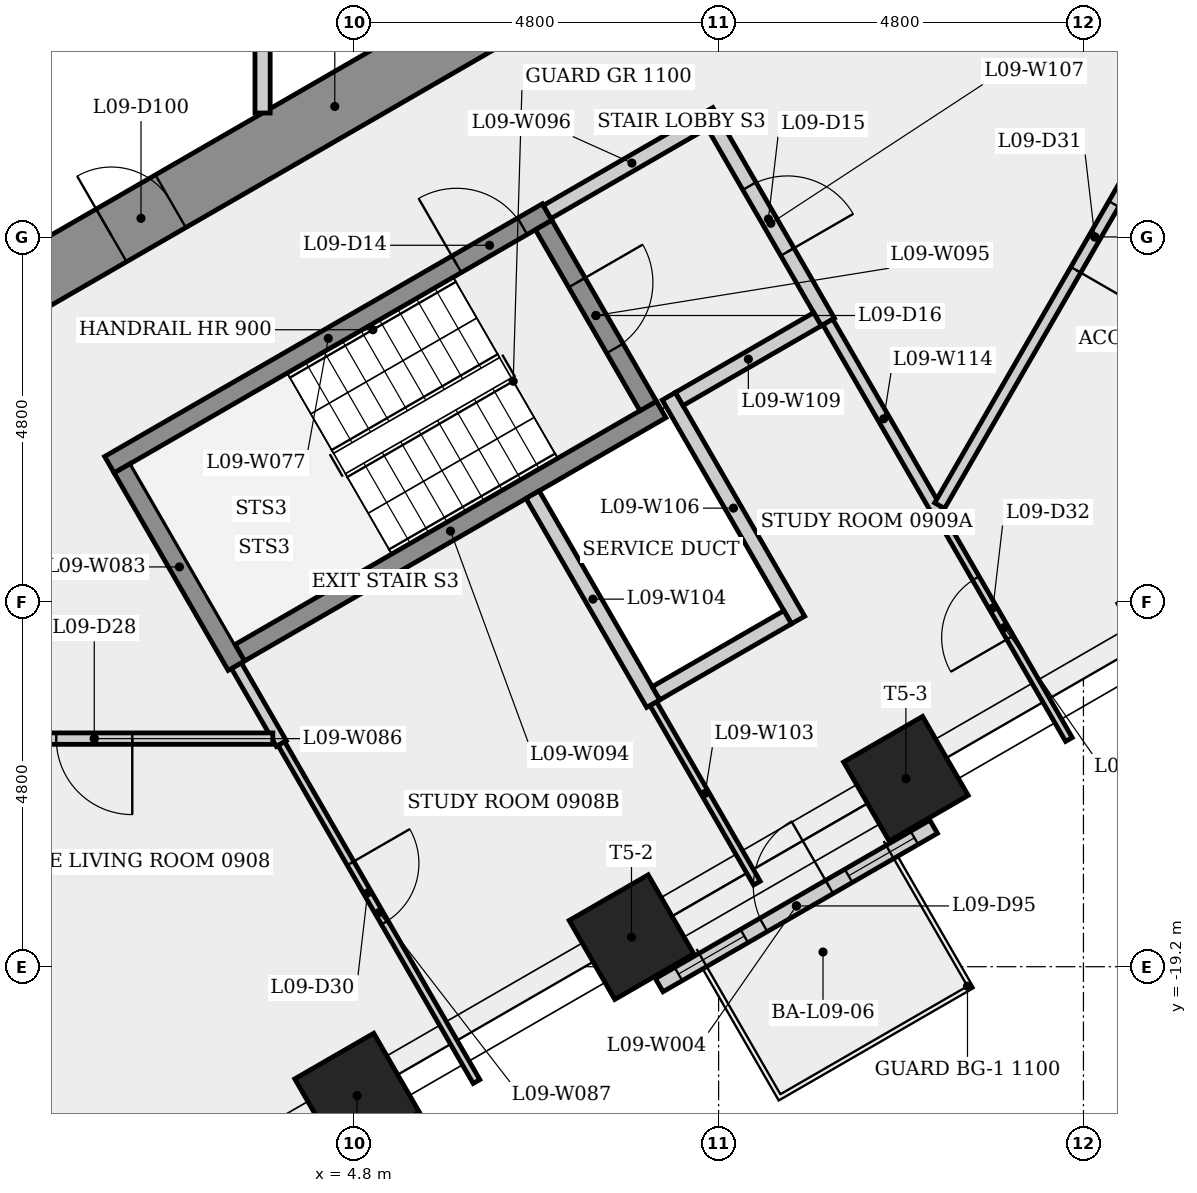
"""IFC4 building model, lengths in metres.
Left out: names, types, materials, properties, quantities, classifications, styles, units other than length and angle.
Written with IfcOpenShell. Run it as: python <this file> out.ifc"""

import sys

from ifc_helpers import new_model, si_unit, direction, frame, frame_2d, origin, origin_2d, place, context, subcontext, project, spatial, rectangle, extrude, element, fill, save


model = new_model("IFC4")
c1 = context("Model", 3, precision=1e-05, world=origin(), true_north=direction((0.0, 1.0)))
c2 = subcontext(c1, "Body", "Model", "MODEL_VIEW")
j1 = project(units=[si_unit("LENGTHUNIT", "METRE"), si_unit("PLANEANGLEUNIT", "RADIAN")], contexts=[c1])
p1 = place(None, origin())
s1 = spatial("IfcSite", under=j1, at=p1, CompositionType="ELEMENT")
p2 = place(p1, origin())
s2 = spatial("IfcBuilding", under=s1, at=p2, CompositionType="ELEMENT")
p3 = place(p2, frame((0.0, 0.0, 39.1)))
s3 = spatial("IfcBuildingStorey", under=s2, at=p3, CompositionType="ELEMENT", Elevation=39.1)
p4 = place(p3, frame((-0.2, -10.623, 0.0), z_axis=(0.0, 0.0, 1.0), x_axis=(0.866023993627, 0.500002442456, 0.0)))
e1 = element("IfcWall", 1, at=p4, inside=s3, PredefinedType="SHEAR", context=c2, shape_type="SweptSolid", body=[
    extrude(rectangle(XDim=10.97, YDim=0.8, at=frame_2d((5.485, 0.0))), origin(), (0.0, 0.0, 1.0), 3.4),
])
p5 = place(p4, frame((2.091, 0.0, 0.0)))
e2 = element("IfcOpeningElement", 2, at=p5, cuts=e1, PredefinedType="OPENING", context=c2, shape_type="SweptSolid", body=[
    extrude(rectangle(XDim=0.9, YDim=2.1, at=frame_2d((0.45, 1.05))), frame((0.0, 0.41, 0.0), z_axis=(0.0, -1.0, 0.0), x_axis=(1.0, 0.0, 0.0)), (0.0, 0.0, 1.0), 0.82),
])
p6 = place(p4, frame((9.325, 0.0, 0.0)))
e3 = element("IfcOpeningElement", 3, at=p6, cuts=e1, PredefinedType="OPENING", context=c2, shape_type="SweptSolid", body=[
    extrude(rectangle(XDim=0.9, YDim=2.1, at=frame_2d((0.45, 1.05))), frame((0.0, 0.41, 0.0), z_axis=(0.0, -1.0, 0.0), x_axis=(1.0, 0.0, 0.0)), (0.0, 0.0, 1.0), 0.82),
])
for number, where, z_axis, x_axis in (
    (4, (4.843, -20.895, 0.0), (0.0, 0.0, 1.0), (0.5, -0.866, 0.0)),
    (5, (8.454, -18.811, 0.0), (0.0, 0.0, 1.0), (0.5, -0.866, 0.0)),
    (6, (12.064, -16.727, 0.0), (0.0, 0.0, 1.0), (0.5, -0.866, 0.0)),
):
    element("IfcColumn", number, at=place(p3, frame(where, z_axis=z_axis, x_axis=x_axis)), inside=s3, PredefinedType="COLUMN", context=c2, shape_type="SweptSolid", body=[
        extrude(rectangle(XDim=1.2, YDim=1.2, at=origin_2d()), origin(), (0.0, 0.0, 1.0), 3.4),
    ])
p7 = place(p3, frame((8.819, -19.443, 0.0), z_axis=(0.0, 0.0, 1.0), x_axis=(0.866036386482, 0.499980976928, 0.0)))
e7 = element("IfcWall", 7, at=p7, inside=s3, PredefinedType="SOLIDWALL", context=c2, shape_type="SweptSolid", body=[
    extrude(rectangle(XDim=4.169, YDim=0.2, at=frame_2d((2.084, 0.0))), origin(), (0.0, 0.0, 1.0), 3.4),
])
p8 = place(p7, frame((1.584, 0.0, 0.0)))
e8 = element("IfcOpeningElement", 8, at=p8, cuts=e7, PredefinedType="OPENING", context=c2, shape_type="SweptSolid", body=[
    extrude(rectangle(XDim=1.0, YDim=2.4, at=frame_2d((0.5, 1.2))), frame((0.0, 0.11, 0.0), z_axis=(0.0, -1.0, 0.0), x_axis=(1.0, 0.0, 0.0)), (0.0, 0.0, 1.0), 0.22),
])
p9 = place(p7, frame((0.292, 0.0, 0.9)))
e9 = element("IfcOpeningElement", 9, at=p9, cuts=e7, PredefinedType="OPENING", context=c2, shape_type="SweptSolid", body=[
    extrude(rectangle(XDim=1.0, YDim=1.5, at=frame_2d((0.5, 0.75))), frame((0.0, 0.11, 0.0), z_axis=(0.0, -1.0, 0.0), x_axis=(1.0, 0.0, 0.0)), (0.0, 0.0, 1.0), 0.22),
])
p10 = place(p7, frame((2.877, 0.0, 0.9)))
e10 = element("IfcOpeningElement", 10, at=p10, cuts=e7, PredefinedType="OPENING", context=c2, shape_type="SweptSolid", body=[
    extrude(rectangle(XDim=1.0, YDim=1.5, at=frame_2d((0.5, 0.75))), frame((0.0, 0.11, 0.0), z_axis=(0.0, -1.0, 0.0), x_axis=(1.0, 0.0, 0.0)), (0.0, 0.0, 1.0), 0.22),
])
p11 = place(p3, frame((1.585, -12.595, 0.0), z_axis=(0.0, 0.0, 1.0), x_axis=(0.866036417653, 0.499980922934, 0.0)))
e11 = element("IfcWall", 11, at=p11, inside=s3, PredefinedType="SHEAR", context=c2, shape_type="SweptSolid", body=[
    extrude(rectangle(XDim=6.65, YDim=0.25, at=frame_2d((3.325, 0.0))), origin(), (0.0, 0.0, 1.0), 3.05),
])
p12 = place(p11, frame((5.275, 0.0, 0.0)))
e12 = element("IfcOpeningElement", 12, at=p12, cuts=e11, PredefinedType="OPENING", context=c2, shape_type="SweptSolid", body=[
    extrude(rectangle(XDim=1.0, YDim=2.1, at=frame_2d((0.5, 1.05))), frame((0.0, 0.135, 0.0), z_axis=(0.0, -1.0, 0.0), x_axis=(1.0, 0.0, 0.0)), (0.0, 0.0, 1.0), 0.27),
])
p13 = place(p3, frame((3.256, -15.239, 0.0), z_axis=(0.0, 0.0, 1.0), x_axis=(0.499954554753, -0.86605164002, 0.0)))
e13 = element("IfcWall", 13, at=p13, inside=s3, PredefinedType="PARTITIONING", context=c2, shape_type="SweptSolid", body=[
    extrude(rectangle(XDim=1.184, YDim=0.15, at=frame_2d((0.592, 0.0))), origin(), (0.0, 0.0, 1.0), 3.05),
])
p14 = place(p3, frame((3.256, -15.239, 0.0), z_axis=(0.0, 0.0, 1.0), x_axis=(-0.50002537861, 0.866010750942, 0.0)))
e14 = element("IfcWall", 14, at=p14, inside=s3, PredefinedType="SHEAR", context=c2, shape_type="SweptSolid", body=[
    extrude(rectangle(XDim=3.0, YDim=0.25, at=frame_2d((1.5, 0.0))), origin(), (0.0, 0.0, 1.0), 3.05),
])
p15 = place(p3, frame((3.6, -5.275, 0.0), z_axis=(0.0, 0.0, 1.0), x_axis=(0.0, -1.0, 0.0)))
e15 = element("IfcWall", 15, at=p15, inside=s3, PredefinedType="PARTITIONING", context=c2, shape_type="SweptSolid", body=[
    extrude(rectangle(XDim=2.692, YDim=0.2, at=frame_2d((1.346, 0.0))), origin(), (0.0, 0.0, 1.0), 3.05),
])
p16 = place(p3, frame((3.735, -16.199, 0.0), z_axis=(0.0, 0.0, 1.0), x_axis=(-1.0, 0.0, 0.0)))
e16 = element("IfcWall", 16, at=p16, inside=s3, PredefinedType="PARTITIONING", context=c2, shape_type="SweptSolid", body=[
    extrude(rectangle(XDim=4.698, YDim=0.15, at=frame_2d((2.349, 0.0))), origin(), (0.0, 0.0, 1.0), 3.05),
])
p17 = place(p16, frame((1.849, 0.0, 0.0)))
e17 = element("IfcOpeningElement", 17, at=p17, cuts=e16, PredefinedType="OPENING", context=c2, shape_type="SweptSolid", body=[
    extrude(rectangle(XDim=1.0, YDim=2.1, at=frame_2d((0.5, 1.05))), frame((0.0, 0.085, 0.0), z_axis=(0.0, -1.0, 0.0), x_axis=(1.0, 0.0, 0.0)), (0.0, 0.0, 1.0), 0.17),
])
p18 = place(p3, frame((3.847, -16.264, 0.0), z_axis=(0.0, 0.0, 1.0), x_axis=(0.50000507078, -0.866022476149, 0.0)))
e18 = element("IfcWall", 18, at=p18, inside=s3, PredefinedType="PARTITIONING", context=c2, shape_type="SweptSolid", body=[
    extrude(rectangle(XDim=5.135, YDim=0.1, at=frame_2d((2.567, 0.0))), origin(), (0.0, 0.0, 1.0), 3.05),
])
p19 = place(p18, frame((1.819, 0.0, 0.0)))
e19 = element("IfcOpeningElement", 19, at=p19, cuts=e18, PredefinedType="OPENING", context=c2, shape_type="SweptSolid", body=[
    extrude(rectangle(XDim=0.9, YDim=2.1, at=frame_2d((0.45, 1.05))), frame((0.0, 0.06, 0.0), z_axis=(0.0, -1.0, 0.0), x_axis=(1.0, 0.0, 0.0)), (0.0, 0.0, 1.0), 0.12),
])
p20 = place(p3, frame((3.301, -15.068, 0.0), z_axis=(0.0, 0.0, 1.0), x_axis=(0.866035036182, 0.499983315828, 0.0)))
e20 = element("IfcWall", 20, at=p20, inside=s3, PredefinedType="SHEAR", context=c2, shape_type="SweptSolid", body=[
    extrude(rectangle(XDim=6.4, YDim=0.25, at=frame_2d((3.2, 0.0))), origin(), (0.0, 0.0, 1.0), 3.05),
])
p21 = place(p3, frame((7.298, -9.441, 0.0), z_axis=(0.0, 0.0, 1.0), x_axis=(0.500034990121, -0.866005201286, 0.0)))
e21 = element("IfcWall", 21, at=p21, inside=s3, PredefinedType="SHEAR", context=c2, shape_type="SweptSolid", body=[
    extrude(rectangle(XDim=2.75, YDim=0.25, at=frame_2d((1.375, 0.0))), origin(), (0.0, 0.0, 1.0), 3.05),
])
p22 = place(p21, frame((0.875, 0.0, 0.0)))
e22 = element("IfcOpeningElement", 22, at=p22, cuts=e21, PredefinedType="OPENING", context=c2, shape_type="SweptSolid", body=[
    extrude(rectangle(XDim=1.0, YDim=2.1, at=frame_2d((0.5, 1.05))), frame((0.0, 0.135, 0.0), z_axis=(0.0, -1.0, 0.0), x_axis=(1.0, 0.0, 0.0)), (0.0, 0.0, 1.0), 0.27),
])
p23 = place(p3, frame((7.344, -9.27, 0.0), z_axis=(0.0, 0.0, 1.0), x_axis=(0.866005588531, 0.500034319456, 0.0)))
e23 = element("IfcWall", 23, at=p23, inside=s3, PredefinedType="PARTITIONING", context=c2, shape_type="SweptSolid", body=[
    extrude(rectangle(XDim=2.575, YDim=0.2, at=frame_2d((1.288, 0.0))), origin(), (0.0, 0.0, 1.0), 3.05),
])
p24 = place(p3, frame((8.74, -15.738, 0.0), z_axis=(0.0, 0.0, 1.0), x_axis=(0.500009139881, -0.866020126807, 0.0)))
e24 = element("IfcWall", 24, at=p24, inside=s3, PredefinedType="PARTITIONING", context=c2, shape_type="SweptSolid", body=[
    extrude(rectangle(XDim=2.728, YDim=0.1, at=frame_2d((1.364, 0.0))), origin(), (0.0, 0.0, 1.0), 3.05),
])
p25 = place(p3, frame((8.74, -15.739, 0.0), z_axis=(0.0, 0.0, 1.0), x_axis=(-0.500017526161, 0.866015284814, 0.0)))
e25 = element("IfcWall", 25, at=p25, inside=s3, PredefinedType="PLUMBINGWALL", context=c2, shape_type="SweptSolid", body=[
    extrude(rectangle(XDim=3.175, YDim=0.2, at=frame_2d((1.588, 0.0))), origin(), (0.0, 0.0, 1.0), 3.05),
])
p26 = place(p3, frame((8.945, -11.694, 0.0), z_axis=(0.0, 0.0, 1.0), x_axis=(0.500062241894, -0.865989465428, 0.0)))
e26 = element("IfcWall", 26, at=p26, inside=s3, PredefinedType="PLUMBINGWALL", context=c2, shape_type="SweptSolid", body=[
    extrude(rectangle(XDim=3.4, YDim=0.2, at=frame_2d((1.7, 0.0))), origin(), (0.0, 0.0, 1.0), 3.05),
])
p27 = place(p3, frame((9.537, -8.119, 0.0), z_axis=(0.0, 0.0, 1.0), x_axis=(0.499990139034, -0.866031096941, 0.0)))
e27 = element("IfcWall", 27, at=p27, inside=s3, PredefinedType="PARTITIONING", context=c2, shape_type="SweptSolid", body=[
    extrude(rectangle(XDim=3.0, YDim=0.2, at=frame_2d((1.5, 0.0))), origin(), (0.0, 0.0, 1.0), 3.05),
])
p28 = place(p27, frame((0.935, 0.0, 0.0)))
e28 = element("IfcOpeningElement", 28, at=p28, cuts=e27, PredefinedType="OPENING", context=c2, shape_type="SweptSolid", body=[
    extrude(rectangle(XDim=1.0, YDim=2.1, at=frame_2d((0.5, 1.05))), frame((0.0, 0.11, 0.0), z_axis=(0.0, -1.0, 0.0), x_axis=(1.0, 0.0, 0.0)), (0.0, 0.0, 1.0), 0.22),
])
p29 = place(p3, frame((10.509, -14.602, 0.0), z_axis=(0.0, 0.0, 1.0), x_axis=(-0.866010750942, -0.50002537861, 0.0)))
e29 = element("IfcWall", 29, at=p29, inside=s3, PredefinedType="PLUMBINGWALL", context=c2, shape_type="SweptSolid", body=[
    extrude(rectangle(XDim=2.0, YDim=0.2, at=frame_2d((1.0, 0.0))), origin(), (0.0, 0.0, 1.0), 3.05),
])
p30 = place(p3, frame((10.901, -10.681, 0.0), z_axis=(0.0, 0.0, 1.0), x_axis=(-0.866009402589, -0.500027713859, 0.0)))
e30 = element("IfcWall", 30, at=p30, inside=s3, PredefinedType="PARTITIONING", context=c2, shape_type="SweptSolid", body=[
    extrude(rectangle(XDim=2.1, YDim=0.2, at=frame_2d((1.05, 0.0))), origin(), (0.0, 0.0, 1.0), 3.05),
])
p31 = place(p3, frame((12.508, -13.264, 0.0), z_axis=(0.0, 0.0, 1.0), x_axis=(-0.499942839543, 0.866058402875, 0.0)))
e31 = element("IfcWall", 31, at=p31, inside=s3, PredefinedType="PARTITIONING", context=c2, shape_type="SweptSolid", body=[
    extrude(rectangle(XDim=2.941, YDim=0.15, at=frame_2d((1.47, 0.0))), origin(), (0.0, 0.0, 1.0), 3.05),
])
p32 = place(p3, frame((14.209, -16.211, 0.0), z_axis=(0.0, 0.0, 1.0), x_axis=(-0.500020569521, 0.86601352764, 0.0)))
e32 = element("IfcWall", 32, at=p32, inside=s3, PredefinedType="PARTITIONING", context=c2, shape_type="SweptSolid", body=[
    extrude(rectangle(XDim=3.403, YDim=0.1, at=frame_2d((1.701, 0.0))), origin(), (0.0, 0.0, 1.0), 3.05),
])
p33 = place(p32, frame((1.549, 0.0, 0.0)))
e33 = element("IfcOpeningElement", 33, at=p33, cuts=e32, PredefinedType="OPENING", context=c2, shape_type="SweptSolid", body=[
    extrude(rectangle(XDim=0.9, YDim=2.1, at=frame_2d((0.45, 1.05))), frame((0.0, 0.06, 0.0), z_axis=(0.0, -1.0, 0.0), x_axis=(1.0, 0.0, 0.0)), (0.0, 0.0, 1.0), 0.12),
])
p34 = place(p3, frame((16.591, -6.061, 0.0), z_axis=(0.0, 0.0, 1.0), x_axis=(-0.500016592557, -0.866015823855, 0.0)))
e34 = element("IfcWall", 34, at=p34, inside=s3, PredefinedType="PARTITIONING", context=c2, shape_type="SweptSolid", body=[
    extrude(rectangle(XDim=8.167, YDim=0.15, at=frame_2d((4.083, 0.0))), origin(), (0.0, 0.0, 1.0), 3.05),
])
p35 = place(p34, frame((3.583, 0.0, 0.0)))
e35 = element("IfcOpeningElement", 35, at=p35, cuts=e34, PredefinedType="OPENING", context=c2, shape_type="SweptSolid", body=[
    extrude(rectangle(XDim=1.0, YDim=2.1, at=frame_2d((0.5, 1.05))), frame((0.0, 0.085, 0.0), z_axis=(0.0, -1.0, 0.0), x_axis=(1.0, 0.0, 0.0)), (0.0, 0.0, 1.0), 0.17),
])
p36 = place(p8, origin())
e36 = element("IfcDoor", 36, at=p36, inside=s3, OperationType="SINGLE_SWING_RIGHT", PredefinedType="DOOR", context=c2, shape_type="SweptSolid", body=[
    extrude(rectangle(XDim=1.0, YDim=2.4, at=frame_2d((0.5, 1.2))), frame((0.0, 0.025, 0.0), z_axis=(0.0, -1.0, 0.0), x_axis=(1.0, 0.0, 0.0)), (0.0, 0.0, 1.0), 0.05),
])
fill(e8, e36)
p37 = place(p9, origin())
e37 = element("IfcWindow", 37, at=p37, inside=s3, PartitioningType="SINGLE_PANEL", PredefinedType="WINDOW", context=c2, shape_type="SweptSolid", body=[
    extrude(rectangle(XDim=1.0, YDim=1.5, at=frame_2d((0.5, 0.75))), frame((0.0, 0.03, 0.0), z_axis=(0.0, -1.0, 0.0), x_axis=(1.0, 0.0, 0.0)), (0.0, 0.0, 1.0), 0.06),
])
fill(e9, e37)
p38 = place(p10, origin())
e38 = element("IfcWindow", 38, at=p38, inside=s3, PartitioningType="SINGLE_PANEL", PredefinedType="WINDOW", context=c2, shape_type="SweptSolid", body=[
    extrude(rectangle(XDim=1.0, YDim=1.5, at=frame_2d((0.5, 0.75))), frame((0.0, 0.03, 0.0), z_axis=(0.0, -1.0, 0.0), x_axis=(1.0, 0.0, 0.0)), (0.0, 0.0, 1.0), 0.06),
])
fill(e10, e38)
p39 = place(p12, origin())
e39 = element("IfcDoor", 39, at=p39, inside=s3, OperationType="SINGLE_SWING_LEFT", PredefinedType="DOOR", context=c2, shape_type="SweptSolid", body=[
    extrude(rectangle(XDim=1.0, YDim=2.1, at=frame_2d((0.5, 1.05))), frame((0.0, 0.025, 0.0), z_axis=(0.0, -1.0, 0.0), x_axis=(1.0, 0.0, 0.0)), (0.0, 0.0, 1.0), 0.05),
])
fill(e12, e39)
p40 = place(p28, origin())
e40 = element("IfcDoor", 40, at=p40, inside=s3, OperationType="SINGLE_SWING_RIGHT", PredefinedType="DOOR", context=c2, shape_type="SweptSolid", body=[
    extrude(rectangle(XDim=1.0, YDim=2.1, at=frame_2d((0.5, 1.05))), frame((0.0, 0.025, 0.0), z_axis=(0.0, -1.0, 0.0), x_axis=(1.0, 0.0, 0.0)), (0.0, 0.0, 1.0), 0.05),
])
fill(e28, e40)
p41 = place(p22, origin())
e41 = element("IfcDoor", 41, at=p41, inside=s3, OperationType="SINGLE_SWING_LEFT", PredefinedType="DOOR", context=c2, shape_type="SweptSolid", body=[
    extrude(rectangle(XDim=1.0, YDim=2.1, at=frame_2d((0.5, 1.05))), frame((0.0, 0.025, 0.0), z_axis=(0.0, -1.0, 0.0), x_axis=(1.0, 0.0, 0.0)), (0.0, 0.0, 1.0), 0.05),
])
fill(e22, e41)
p42 = place(p17, origin())
e42 = element("IfcDoor", 42, at=p42, inside=s3, OperationType="SINGLE_SWING_LEFT", PredefinedType="DOOR", context=c2, shape_type="SweptSolid", body=[
    extrude(rectangle(XDim=1.0, YDim=2.1, at=frame_2d((0.5, 1.05))), frame((0.0, 0.025, 0.0), z_axis=(0.0, -1.0, 0.0), x_axis=(1.0, 0.0, 0.0)), (0.0, 0.0, 1.0), 0.05),
])
fill(e17, e42)
p43 = place(p19, origin())
e43 = element("IfcDoor", 43, at=p43, inside=s3, OperationType="SINGLE_SWING_LEFT", PredefinedType="DOOR", context=c2, shape_type="SweptSolid", body=[
    extrude(rectangle(XDim=0.9, YDim=2.1, at=frame_2d((0.45, 1.05))), frame((0.0, 0.025, 0.0), z_axis=(0.0, -1.0, 0.0), x_axis=(1.0, 0.0, 0.0)), (0.0, 0.0, 1.0), 0.05),
])
fill(e19, e43)
p44 = place(p35, origin())
e44 = element("IfcDoor", 44, at=p44, inside=s3, OperationType="SINGLE_SWING_RIGHT", PredefinedType="DOOR", context=c2, shape_type="SweptSolid", body=[
    extrude(rectangle(XDim=1.0, YDim=2.1, at=frame_2d((0.5, 1.05))), frame((0.0, 0.025, 0.0), z_axis=(0.0, -1.0, 0.0), x_axis=(1.0, 0.0, 0.0)), (0.0, 0.0, 1.0), 0.05),
])
fill(e35, e44)
p45 = place(p33, origin())
e45 = element("IfcDoor", 45, at=p45, inside=s3, OperationType="SINGLE_SWING_LEFT", PredefinedType="DOOR", context=c2, shape_type="SweptSolid", body=[
    extrude(rectangle(XDim=0.9, YDim=2.1, at=frame_2d((0.45, 1.05))), frame((0.0, 0.025, 0.0), z_axis=(0.0, -1.0, 0.0), x_axis=(1.0, 0.0, 0.0)), (0.0, 0.0, 1.0), 0.05),
])
fill(e33, e45)
p46 = place(p5, origin())
e46 = element("IfcDoor", 46, at=p46, inside=s3, OperationType="SINGLE_SWING_LEFT", PredefinedType="DOOR", context=c2, shape_type="SweptSolid", body=[
    extrude(rectangle(XDim=0.9, YDim=2.1, at=frame_2d((0.45, 1.05))), frame((0.0, 0.025, 0.0), z_axis=(0.0, -1.0, 0.0), x_axis=(1.0, 0.0, 0.0)), (0.0, 0.0, 1.0), 0.05),
])
fill(e2, e46)
save(model, sys.argv[1])
